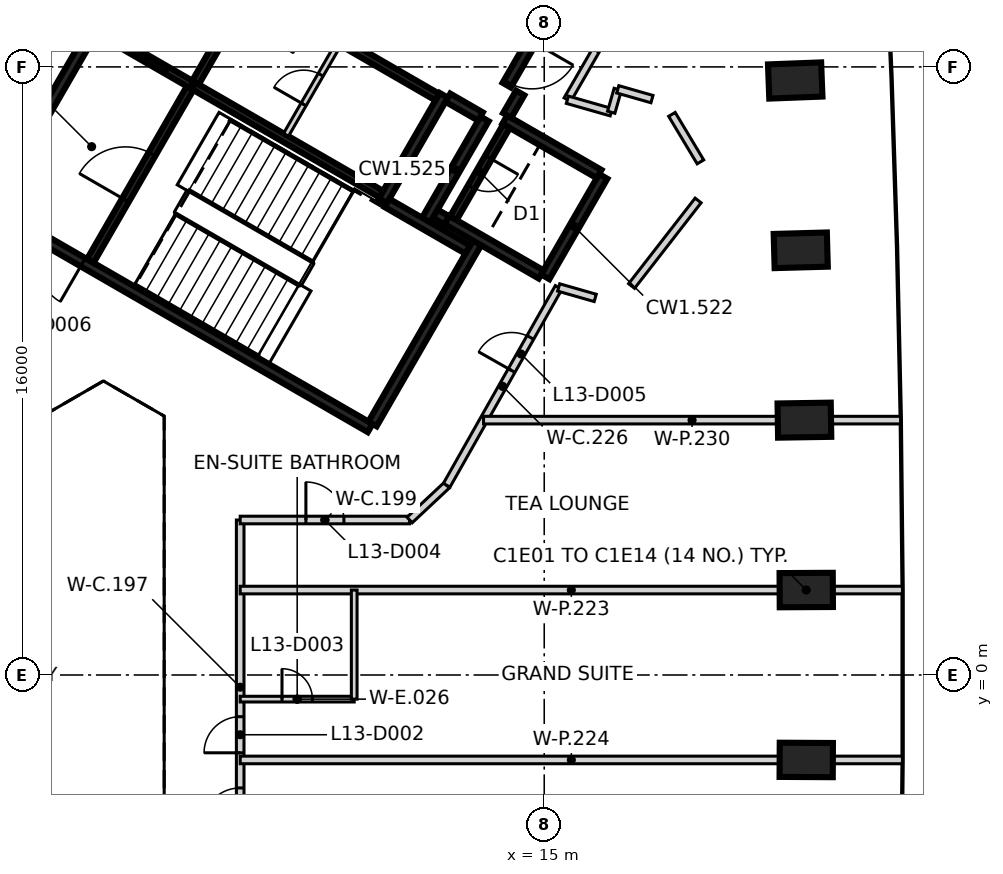
"""IFC4 building model, lengths in metres.
Left out: names, types, materials, properties, quantities, classifications, styles, units other than length and angle.
Written with IfcOpenShell. Run it as: python <this file> out.ifc"""

import sys

from ifc_helpers import new_model, si_unit, direction, frame, frame_2d, origin, origin_2d, place, context, subcontext, project, spatial, rectangle, extrude, element, fill, save


model = new_model("IFC4")
c1 = context("Model", 3, precision=1e-05, world=origin(), true_north=direction((0.0, 1.0)))
c2 = subcontext(c1, "Body", "Model", "MODEL_VIEW")
j1 = project(units=[si_unit("LENGTHUNIT", "METRE"), si_unit("PLANEANGLEUNIT", "RADIAN")], contexts=[c1])
p1 = place(None, origin())
s1 = spatial("IfcSite", under=j1, at=p1, CompositionType="ELEMENT")
p2 = place(p1, origin())
s2 = spatial("IfcBuilding", under=s1, at=p2, CompositionType="ELEMENT")
p3 = place(p2, frame((0.0, 0.0, 60.2)))
s3 = spatial("IfcBuildingStorey", under=s2, at=p3, CompositionType="ELEMENT", Elevation=60.2)
for number, where, z_axis, x_axis in (
    (1, (21.894, -2.235, -0.475), (0.0, 0.0, 1.0), (-1.0, 0.005, 0.0)),
    (2, (21.894, 2.235, -0.475), (0.0, 0.0, 1.0), (1.0, 0.005, 0.0)),
    (3, (21.846, 6.706, -0.475), (0.0, 0.0, 1.0), (1.0, 0.016, 0.0)),
    (4, (21.749, 11.174, -0.475), (0.0, 0.0, 1.0), (1.0, 0.027, 0.0)),
    (5, (21.604, 15.643, -0.475), (0.0, 0.0, 1.0), (0.999, 0.038, 0.0)),
):
    element("IfcColumn", number, at=place(p3, frame(where, z_axis=z_axis, x_axis=x_axis)), inside=s3, PredefinedType="COLUMN", context=c2, shape_type="SweptSolid", body=[
        extrude(rectangle(XDim=1.4, YDim=0.9, at=origin_2d()), origin(), (0.0, 0.0, 1.0), 3.6),
    ])
p4 = place(p3, frame((10.42, 6.498, 0.0), z_axis=(0.0, 0.0, 1.0), x_axis=(-0.866021906294, 0.500006057782, 0.0)))
e6 = element("IfcWall", 6, at=p4, inside=s3, PredefinedType="SHEAR", context=c2, shape_type="SweptSolid", body=[
    extrude(rectangle(XDim=11.55, YDim=0.25, at=frame_2d((5.775, 0.0))), origin(), (0.0, 0.0, 1.0), 3.125),
])
p5 = place(p4, frame((10.025, 0.0, 0.0)))
e7 = element("IfcOpeningElement", 7, at=p5, cuts=e6, PredefinedType="OPENING", context=c2, shape_type="SweptSolid", body=[
    extrude(rectangle(XDim=1.2, YDim=2.1, at=frame_2d((0.6, 1.05))), frame((0.0, 0.135, 0.0), z_axis=(0.0, -1.0, 0.0), x_axis=(1.0, 0.0, 0.0)), (0.0, 0.0, 1.0), 0.27),
])
p6 = place(p4, frame((8.725, 0.0, 0.0)))
e8 = element("IfcOpeningElement", 8, at=p6, cuts=e6, PredefinedType="OPENING", context=c2, shape_type="SweptSolid", body=[
    extrude(rectangle(XDim=1.2, YDim=2.1, at=frame_2d((0.6, 1.05))), frame((0.0, 0.135, 0.0), z_axis=(0.0, -1.0, 0.0), x_axis=(1.0, 0.0, 0.0)), (0.0, 0.0, 1.0), 0.27),
])
p7 = place(p3, frame((0.48, 12.381, 0.0), z_axis=(0.0, 0.0, 1.0), x_axis=(0.49999885962, 0.866026062182, 0.0)))
e9 = element("IfcWall", 9, at=p7, inside=s3, PredefinedType="SHEAR", context=c2, shape_type="SweptSolid", body=[
    extrude(rectangle(XDim=5.225, YDim=0.25, at=frame_2d((2.612, 0.0))), origin(), (0.0, 0.0, 1.0), 3.125),
])
p8 = place(p3, frame((13.238, 11.378, 0.0), z_axis=(0.0, 0.0, 1.0), x_axis=(-0.500008851346, -0.866020293397, 0.0)))
e10 = element("IfcWall", 10, at=p8, inside=s3, PredefinedType="SHEAR", context=c2, shape_type="SweptSolid", body=[
    extrude(rectangle(XDim=5.51, YDim=0.25, at=frame_2d((2.755, 0.0))), origin(), (0.0, 0.0, 1.0), 3.125),
])
p9 = place(p3, frame((12.357, 15.252, 0.0), z_axis=(0.0, 0.0, 1.0), x_axis=(-0.500028443584, -0.866008981251, 0.0)))
e11 = element("IfcWall", 11, at=p9, inside=s3, PredefinedType="SHEAR", context=c2, shape_type="SweptSolid", body=[
    extrude(rectangle(XDim=3.2, YDim=0.25, at=frame_2d((1.6, 0.0))), origin(), (0.0, 0.0, 1.0), 3.125),
])
p10 = place(p3, frame((16.552, 13.119, 0.0), z_axis=(0.0, 0.0, 1.0), x_axis=(-0.499978833458, -0.866037623948, 0.0)))
e12 = element("IfcWall", 12, at=p10, inside=s3, PredefinedType="SHEAR", context=c2, shape_type="SweptSolid", body=[
    extrude(rectangle(XDim=3.05, YDim=0.25, at=frame_2d((1.525, 0.0))), origin(), (0.0, 0.0, 1.0), 3.125),
])
p11 = place(p3, frame((14.918, 10.54, 0.0), z_axis=(0.0, 0.0, 1.0), x_axis=(-0.866063538972, 0.499933942099, 0.0)))
e13 = element("IfcWall", 13, at=p11, inside=s3, PredefinedType="SHEAR", context=c2, shape_type="SweptSolid", body=[
    extrude(rectangle(XDim=2.865, YDim=0.25, at=frame_2d((1.432, 0.0))), origin(), (0.0, 0.0, 1.0), 3.125),
])
p12 = place(p3, frame((13.963, 14.614, 0.0), z_axis=(0.0, 0.0, 1.0), x_axis=(0.866042235819, -0.499970844928, 0.0)))
e14 = element("IfcWall", 14, at=p12, inside=s3, PredefinedType="SHEAR", context=c2, shape_type="SweptSolid", body=[
    extrude(rectangle(XDim=2.865, YDim=0.25, at=frame_2d((1.432, 0.0))), origin(), (0.0, 0.0, 1.0), 3.125),
])
p13 = place(p3, frame((11.888, 11.961, 0.0), z_axis=(0.0, 0.0, 1.0), x_axis=(0.500003324108, 0.866023484601, 0.0)))
e15 = element("IfcWall", 15, at=p13, inside=s3, PredefinedType="SHEAR", context=c2, shape_type="SweptSolid", body=[
    extrude(rectangle(XDim=3.085, YDim=0.25, at=frame_2d((1.542, 0.0))), origin(), (0.0, 0.0, 1.0), 3.125),
])
p14 = place(p3, frame((10.865, 12.418, 0.0), z_axis=(0.0, 0.0, 1.0), x_axis=(0.866026229868, -0.499998569178, 0.0)))
e16 = element("IfcWall", 16, at=p14, inside=s3, PredefinedType="SHEAR", context=c2, shape_type="SweptSolid", body=[
    extrude(rectangle(XDim=2.449, YDim=0.25, at=frame_2d((1.225, 0.0))), origin(), (0.0, 0.0, 1.0), 3.125),
])
p15 = place(p3, frame((14.945, 17.135, 0.0), z_axis=(0.0, 0.0, 1.0), x_axis=(-0.499983108224, -0.866035156036, 0.0)))
e17 = element("IfcWall", 17, at=p15, inside=s3, PredefinedType="SHEAR", context=c2, shape_type="SweptSolid", body=[
    extrude(rectangle(XDim=1.865, YDim=0.25, at=frame_2d((0.932, 0.0))), origin(), (0.0, 0.0, 1.0), 3.125),
])
p16 = place(p15, frame((0.535, 0.0, 0.0)))
e18 = element("IfcOpeningElement", 18, at=p16, cuts=e17, PredefinedType="OPENING", context=c2, shape_type="SweptSolid", body=[
    extrude(rectangle(XDim=1.25, YDim=2.1, at=frame_2d((0.625, 1.05))), frame((0.0, 0.135, 0.0), z_axis=(0.0, -1.0, 0.0), x_axis=(1.0, 0.0, 0.0)), (0.0, 0.0, 1.0), 0.27),
])
p17 = place(p3, frame((13.322, 14.695, 0.0), z_axis=(0.0, 0.0, 1.0), x_axis=(-0.866017078145, 0.500014420154, 0.0)))
e19 = element("IfcWall", 19, at=p17, inside=s3, PredefinedType="SHEAR", context=c2, shape_type="SweptSolid", body=[
    extrude(rectangle(XDim=0.989, YDim=0.25, at=frame_2d((0.495, 0.0))), origin(), (0.0, 0.0, 1.0), 3.125),
])
p18 = place(p3, frame((14.368, 15.315, 0.0), z_axis=(0.0, 0.0, 1.0), x_axis=(-0.499897359611, -0.866084655132, 0.0)))
e20 = element("IfcWall", 20, at=p18, inside=s3, PredefinedType="SHEAR", context=c2, shape_type="SweptSolid", body=[
    extrude(rectangle(XDim=0.685, YDim=0.25, at=frame_2d((0.342, 0.0))), origin(), (0.0, 0.0, 1.0), 3.125),
])
p19 = place(p3, frame((12.433, 11.964, 0.0), z_axis=(0.0, 0.0, 1.0), x_axis=(-0.866055875208, 0.499947218231, 0.0)))
e21 = element("IfcWall", 21, at=p19, inside=s3, PredefinedType="SHEAR", context=c2, shape_type="SweptSolid", body=[
    extrude(rectangle(XDim=0.345, YDim=0.25, at=frame_2d((0.172, 0.0))), origin(), (0.0, 0.0, 1.0), 3.125),
])
p20 = place(p3, frame((5.775, 15.502, 0.0), z_axis=(0.0, 0.0, 1.0), x_axis=(0.866020080793, -0.500009219579, 0.0)))
e22 = element("IfcWall", 22, at=p20, inside=s3, PredefinedType="SHEAR", context=c2, shape_type="SweptSolid", body=[
    extrude(rectangle(XDim=5.699, YDim=0.2, at=frame_2d((2.85, 0.0))), origin(), (0.0, 0.0, 1.0), 3.125),
])
p21 = place(p3, frame((12.185, 15.207, 0.0), z_axis=(0.0, 0.0, 1.0), x_axis=(-0.866020080793, 0.500009219579, 0.0)))
e23 = element("IfcWall", 23, at=p21, inside=s3, PredefinedType="SHEAR", context=c2, shape_type="SweptSolid", body=[
    extrude(rectangle(XDim=5.699, YDim=0.2, at=frame_2d((2.85, 0.0))), origin(), (0.0, 0.0, 1.0), 3.125),
])
p22 = place(p21, frame((3.874, 0.0, 0.0)))
e24 = element("IfcOpeningElement", 24, at=p22, cuts=e23, PredefinedType="OPENING", context=c2, shape_type="SweptSolid", body=[
    extrude(rectangle(XDim=0.9, YDim=2.1, at=frame_2d((0.45, 1.05))), frame((0.0, 0.11, 0.0), z_axis=(0.0, -1.0, 0.0), x_axis=(1.0, 0.0, 0.0)), (0.0, 0.0, 1.0), 0.22),
])
p23 = place(p3, frame((3.057, 10.895, 0.0), z_axis=(0.0, 0.0, 1.0), x_axis=(0.499989418164, 0.866031513124, 0.0)))
e25 = element("IfcWall", 25, at=p23, inside=s3, PredefinedType="SHEAR", context=c2, shape_type="SweptSolid", body=[
    extrude(rectangle(XDim=5.251, YDim=0.2, at=frame_2d((2.625, 0.0))), origin(), (0.0, 0.0, 1.0), 3.125),
])
p24 = place(p23, frame((1.849, 0.0, 0.0)))
e26 = element("IfcOpeningElement", 26, at=p24, cuts=e25, PredefinedType="OPENING", context=c2, shape_type="SweptSolid", body=[
    extrude(rectangle(XDim=1.4, YDim=2.1, at=frame_2d((0.7, 1.05))), frame((0.0, 0.11, 0.0), z_axis=(0.0, -1.0, 0.0), x_axis=(1.0, 0.0, 0.0)), (0.0, 0.0, 1.0), 0.22),
])
p25 = place(p3, frame((14.008, 14.442, 0.0), z_axis=(0.0, 0.0, 1.0), x_axis=(-0.499986818241, -0.866033014143, 0.0)))
e27 = element("IfcWall", 27, at=p25, inside=s3, PredefinedType="SHEAR", context=c2, shape_type="SweptSolid", body=[
    extrude(rectangle(XDim=2.798, YDim=0.2, at=frame_2d((1.399, 0.0))), origin(), (0.0, 0.0, 1.0), 3.125),
])
p26 = place(p25, frame((0.949, 0.0, 0.0)))
e28 = element("IfcOpeningElement", 28, at=p26, cuts=e27, PredefinedType="OPENING", context=c2, shape_type="SweptSolid", body=[
    extrude(rectangle(XDim=0.9, YDim=2.1, at=frame_2d((0.45, 1.05))), frame((0.0, 0.11, 0.0), z_axis=(0.0, -1.0, 0.0), x_axis=(1.0, 0.0, 0.0)), (0.0, 0.0, 1.0), 0.22),
])
p27 = place(p3, frame((7.199, 17.97, 0.0), z_axis=(0.0, 0.0, 1.0), x_axis=(-0.499968400327, -0.866043647095, 0.0)))
e29 = element("IfcWall", 29, at=p27, inside=s3, PredefinedType="SHEAR", context=c2, shape_type="SweptSolid", body=[
    extrude(rectangle(XDim=2.75, YDim=0.2, at=frame_2d((1.375, 0.0))), origin(), (0.0, 0.0, 1.0), 3.125),
])
p28 = place(p3, frame((5.725, 15.531, 0.0), z_axis=(0.0, 0.0, 1.0), x_axis=(-0.866037306777, 0.499979382845, 0.0)))
e30 = element("IfcWall", 30, at=p28, inside=s3, PredefinedType="SHEAR", context=c2, shape_type="SweptSolid", body=[
    extrude(rectangle(XDim=2.742, YDim=0.2, at=frame_2d((1.371, 0.0))), origin(), (0.0, 0.0, 1.0), 3.125),
])
p29 = place(p28, frame((0.743, 0.0, 0.0)))
e31 = element("IfcOpeningElement", 31, at=p29, cuts=e30, PredefinedType="OPENING", context=c2, shape_type="SweptSolid", body=[
    extrude(rectangle(XDim=1.3, YDim=2.1, at=frame_2d((0.65, 1.05))), frame((0.0, 0.11, 0.0), z_axis=(0.0, -1.0, 0.0), x_axis=(1.0, 0.0, 0.0)), (0.0, 0.0, 1.0), 0.22),
])
p30 = place(p3, frame((8.207, 14.214, 0.0), z_axis=(0.0, 0.0, 1.0), x_axis=(0.499922376475, 0.866070215109, 0.0)))
e32 = element("IfcWall", 32, at=p30, inside=s3, PredefinedType="PARTITIONING", context=c2, shape_type="SweptSolid", body=[
    extrude(rectangle(XDim=2.749, YDim=0.15, at=frame_2d((1.374, 0.0))), origin(), (0.0, 0.0, 1.0), 3.125),
])
p31 = place(p30, frame((0.924, 0.0, 0.0)))
e33 = element("IfcOpeningElement", 33, at=p31, cuts=e32, PredefinedType="OPENING", context=c2, shape_type="SweptSolid", body=[
    extrude(rectangle(XDim=0.9, YDim=2.1, at=frame_2d((0.45, 1.05))), frame((0.0, 0.085, 0.0), z_axis=(0.0, -1.0, 0.0), x_axis=(1.0, 0.0, 0.0)), (0.0, 0.0, 1.0), 0.17),
])
p32 = place(p3, frame((7.0, -4.721, 0.0), z_axis=(0.0, 0.0, 1.0), x_axis=(0.0, 1.0, 0.0)))
e34 = element("IfcWall", 34, at=p32, inside=s3, PredefinedType="PARTITIONING", context=c2, shape_type="SweptSolid", body=[
    extrude(rectangle(XDim=8.799, YDim=0.2, at=frame_2d((4.399, 0.0))), origin(), (0.0, 0.0, 1.0), 3.125),
])
p33 = place(p32, frame((0.749, 0.0, 0.0)))
e35 = element("IfcOpeningElement", 35, at=p33, cuts=e34, PredefinedType="OPENING", context=c2, shape_type="SweptSolid", body=[
    extrude(rectangle(XDim=1.0, YDim=2.1, at=frame_2d((0.5, 1.05))), frame((0.0, 0.11, 0.0), z_axis=(0.0, -1.0, 0.0), x_axis=(1.0, 0.0, 0.0)), (0.0, 0.0, 1.0), 0.22),
])
p34 = place(p32, frame((2.674, 0.0, 0.0)))
e36 = element("IfcOpeningElement", 36, at=p34, cuts=e34, PredefinedType="OPENING", context=c2, shape_type="SweptSolid", body=[
    extrude(rectangle(XDim=0.95, YDim=2.1, at=frame_2d((0.475, 1.05))), frame((0.0, 0.11, 0.0), z_axis=(0.0, -1.0, 0.0), x_axis=(1.0, 0.0, 0.0)), (0.0, 0.0, 1.0), 0.22),
])
p35 = place(p3, frame((7.0, 4.078, 0.0), z_axis=(0.0, 0.0, 1.0), x_axis=(1.0, 0.0, 0.0)))
e37 = element("IfcWall", 37, at=p35, inside=s3, PredefinedType="PARTITIONING", context=c2, shape_type="SweptSolid", body=[
    extrude(rectangle(XDim=4.458, YDim=0.2, at=frame_2d((2.229, 0.0))), origin(), (0.0, 0.0, 1.0), 3.125),
])
p36 = place(p35, frame((1.729, 0.0, 0.0)))
e38 = element("IfcOpeningElement", 38, at=p36, cuts=e37, PredefinedType="OPENING", context=c2, shape_type="SweptSolid", body=[
    extrude(rectangle(XDim=1.0, YDim=2.1, at=frame_2d((0.5, 1.05))), frame((0.0, 0.11, 0.0), z_axis=(0.0, -1.0, 0.0), x_axis=(1.0, 0.0, 0.0)), (0.0, 0.0, 1.0), 0.22),
])
p37 = place(p3, frame((11.458, 4.078, 0.0), z_axis=(0.0, 0.0, 1.0), x_axis=(0.729936032318, 0.683515463412, 0.0)))
e39 = element("IfcWall", 39, at=p37, inside=s3, PredefinedType="PARTITIONING", context=c2, shape_type="SweptSolid", body=[
    extrude(rectangle(XDim=1.336, YDim=0.2, at=frame_2d((0.668, 0.0))), origin(), (0.0, 0.0, 1.0), 3.125),
])
p38 = place(p3, frame((12.433, 4.992, 0.0), z_axis=(0.0, 0.0, 1.0), x_axis=(0.492583054982, 0.870265438786, 0.0)))
e40 = element("IfcWall", 40, at=p38, inside=s3, PredefinedType="PARTITIONING", context=c2, shape_type="SweptSolid", body=[
    extrude(rectangle(XDim=5.981, YDim=0.2, at=frame_2d((2.991, 0.0))), origin(), (0.0, 0.0, 1.0), 3.125),
])
p39 = place(p38, frame((3.469, 0.0, 0.0)))
e41 = element("IfcOpeningElement", 41, at=p39, cuts=e40, PredefinedType="OPENING", context=c2, shape_type="SweptSolid", body=[
    extrude(rectangle(XDim=1.0, YDim=2.1, at=frame_2d((0.5, 1.05))), frame((0.0, 0.11, 0.0), z_axis=(0.0, -1.0, 0.0), x_axis=(1.0, 0.0, 0.0)), (0.0, 0.0, 1.0), 0.22),
])
p40 = place(p3, frame((15.156, 17.13, 0.0), z_axis=(0.0, 0.0, 1.0), x_axis=(0.865755062894, -0.500467952093, 0.0)))
e42 = element("IfcWall", 42, at=p40, inside=s3, PredefinedType="PARTITIONING", context=c2, shape_type="SweptSolid", body=[
    extrude(rectangle(XDim=1.389, YDim=0.2, at=frame_2d((0.694, 0.0))), origin(), (0.0, 0.0, 1.0), 3.125),
])
p41 = place(p3, frame((15.38, 10.197, 0.0), z_axis=(0.0, 0.0, 1.0), x_axis=(0.961523947641, -0.274721127897, 0.0)))
e43 = element("IfcWall", 43, at=p41, inside=s3, PredefinedType="PARTITIONING", context=c2, shape_type="SweptSolid", body=[
    extrude(rectangle(XDim=1.001, YDim=0.2, at=frame_2d((0.5, 0.0))), origin(), (0.0, 0.0, 1.0), 3.125),
])
p42 = place(p3, frame((15.609, 15.136, 0.0), z_axis=(0.0, 0.0, 1.0), x_axis=(0.499501622561, 0.866312950993, 0.0)))
e44 = element("IfcWall", 44, at=p42, inside=s3, PredefinedType="PARTITIONING", context=c2, shape_type="SweptSolid", body=[
    extrude(rectangle(XDim=1.5, YDim=0.2, at=frame_2d((0.75, 0.0))), origin(), (0.0, 0.0, 1.0), 3.125),
])
p43 = place(p3, frame((15.609, 15.136, 0.0), z_axis=(0.0, 0.0, 1.0), x_axis=(0.961662011825, -0.274237442763, 0.0)))
e45 = element("IfcWall", 45, at=p43, inside=s3, PredefinedType="PARTITIONING", context=c2, shape_type="SweptSolid", body=[
    extrude(rectangle(XDim=1.2, YDim=0.2, at=frame_2d((0.6, 0.0))), origin(), (0.0, 0.0, 1.0), 3.125),
])
p44 = place(p3, frame((16.763, 14.807, 0.0), z_axis=(0.0, 0.0, 1.0), x_axis=(0.274464026122, 0.961597368115, 0.0)))
e46 = element("IfcWall", 46, at=p44, inside=s3, PredefinedType="PARTITIONING", context=c2, shape_type="SweptSolid", body=[
    extrude(rectangle(XDim=0.627, YDim=0.2, at=frame_2d((0.313, 0.0))), origin(), (0.0, 0.0, 1.0), 3.125),
])
p45 = place(p3, frame((16.935, 15.41, 0.0), z_axis=(0.0, 0.0, 1.0), x_axis=(0.961602664273, -0.274445470107, 0.0)))
e47 = element("IfcWall", 47, at=p45, inside=s3, PredefinedType="PARTITIONING", context=c2, shape_type="SweptSolid", body=[
    extrude(rectangle(XDim=0.936, YDim=0.2, at=frame_2d((0.468, 0.0))), origin(), (0.0, 0.0, 1.0), 3.125),
])
p46 = place(p3, frame((17.299, 10.235, 0.0), z_axis=(0.0, 0.0, 1.0), x_axis=(0.61377461522, 0.789481299153, 0.0)))
e48 = element("IfcWall", 48, at=p46, inside=s3, PredefinedType="PARTITIONING", context=c2, shape_type="SweptSolid", body=[
    extrude(rectangle(XDim=2.851, YDim=0.2, at=frame_2d((1.426, 0.0))), origin(), (0.0, 0.0, 1.0), 3.125),
])
p47 = place(p3, frame((18.36, 14.751, 0.0), z_axis=(0.0, 0.0, 1.0), x_axis=(0.514495755428, -0.857492925713, 0.0)))
e49 = element("IfcWall", 49, at=p47, inside=s3, PredefinedType="PARTITIONING", context=c2, shape_type="SweptSolid", body=[
    extrude(rectangle(XDim=1.458, YDim=0.2, at=frame_2d((0.729, 0.0))), origin(), (0.0, 0.0, 1.0), 3.125),
])
p48 = place(p3, frame((7.0, 2.235, 0.0), z_axis=(0.0, 0.0, 1.0), x_axis=(1.0, 0.0, 0.0)))
e50 = element("IfcWall", 50, at=p48, inside=s3, PredefinedType="PARTITIONING", context=c2, shape_type="SweptSolid", body=[
    extrude(rectangle(XDim=17.425, YDim=0.2, at=frame_2d((8.712, 0.0))), origin(), (0.0, 0.0, 1.0), 3.125),
])
p49 = place(p3, frame((7.001, -2.235, 0.0), z_axis=(0.0, 0.0, 1.0), x_axis=(1.0, 0.0, 0.0)))
e51 = element("IfcWall", 51, at=p49, inside=s3, PredefinedType="PARTITIONING", context=c2, shape_type="SweptSolid", body=[
    extrude(rectangle(XDim=17.424, YDim=0.2, at=frame_2d((8.712, 0.0))), origin(), (0.0, 0.0, 1.0), 3.125),
])
p50 = place(p3, frame((13.403, 6.706, 0.0), z_axis=(0.0, 0.0, 1.0), x_axis=(1.0, 0.0, 0.0)))
e52 = element("IfcWall", 52, at=p50, inside=s3, PredefinedType="PARTITIONING", context=c2, shape_type="SweptSolid", body=[
    extrude(rectangle(XDim=10.974, YDim=0.2, at=frame_2d((5.487, 0.0))), origin(), (0.0, 0.0, 1.0), 3.125),
])
p51 = place(p3, frame((7.0, -0.635, 0.0), z_axis=(0.0, 0.0, 1.0), x_axis=(1.0, 0.0, 0.0)))
e53 = element("IfcWall", 53, at=p51, inside=s3, PredefinedType="PARTITIONING", context=c2, shape_type="SweptSolid", body=[
    extrude(rectangle(XDim=3.0, YDim=0.15, at=frame_2d((1.5, 0.0))), origin(), (0.0, 0.0, 1.0), 3.125),
])
p52 = place(p51, frame((1.1, 0.0, 0.0)))
e54 = element("IfcOpeningElement", 54, at=p52, cuts=e53, PredefinedType="OPENING", context=c2, shape_type="SweptSolid", body=[
    extrude(rectangle(XDim=0.8, YDim=2.1, at=frame_2d((0.4, 1.05))), frame((0.0, 0.085, 0.0), z_axis=(0.0, -1.0, 0.0), x_axis=(1.0, 0.0, 0.0)), (0.0, 0.0, 1.0), 0.17),
])
p53 = place(p3, frame((10.0, -0.635, 0.0), z_axis=(0.0, 0.0, 1.0), x_axis=(0.0, 1.0, 0.0)))
e55 = element("IfcWall", 55, at=p53, inside=s3, PredefinedType="PARTITIONING", context=c2, shape_type="SweptSolid", body=[
    extrude(rectangle(XDim=2.87, YDim=0.15, at=frame_2d((1.435, 0.0))), origin(), (0.0, 0.0, 1.0), 3.125),
])
p54 = place(p29, origin())
e56 = element("IfcDoor", 56, at=p54, inside=s3, OperationType="SLIDING_TO_LEFT", PredefinedType="DOOR", context=c2, shape_type="SweptSolid", body=[
    extrude(rectangle(XDim=1.3, YDim=2.1, at=frame_2d((0.65, 1.05))), frame((0.0, 0.025, 0.0), z_axis=(0.0, -1.0, 0.0), x_axis=(1.0, 0.0, 0.0)), (0.0, 0.0, 1.0), 0.05),
])
fill(e31, e56)
p55 = place(p16, origin())
e57 = element("IfcDoor", 57, at=p55, inside=s3, OperationType="SINGLE_SWING_LEFT", PredefinedType="DOOR", context=c2, shape_type="SweptSolid", body=[
    extrude(rectangle(XDim=1.25, YDim=2.1, at=frame_2d((0.625, 1.05))), frame((0.0, 0.025, 0.0), z_axis=(0.0, -1.0, 0.0), x_axis=(1.0, 0.0, 0.0)), (0.0, 0.0, 1.0), 0.05),
])
fill(e18, e57)
p56 = place(p6, origin())
e58 = element("IfcDoor", 58, at=p56, inside=s3, OperationType="SINGLE_SWING_RIGHT", PredefinedType="DOOR", context=c2, shape_type="SweptSolid", body=[
    extrude(rectangle(XDim=1.2, YDim=2.1, at=frame_2d((0.6, 1.05))), frame((0.0, 0.025, 0.0), z_axis=(0.0, -1.0, 0.0), x_axis=(1.0, 0.0, 0.0)), (0.0, 0.0, 1.0), 0.05),
])
fill(e8, e58)
p57 = place(p24, origin())
e59 = element("IfcDoor", 59, at=p57, inside=s3, OperationType="SINGLE_SWING_LEFT", PredefinedType="DOOR", context=c2, shape_type="SweptSolid", body=[
    extrude(rectangle(XDim=1.4, YDim=2.1, at=frame_2d((0.7, 1.05))), frame((0.0, 0.025, 0.0), z_axis=(0.0, -1.0, 0.0), x_axis=(1.0, 0.0, 0.0)), (0.0, 0.0, 1.0), 0.05),
])
fill(e26, e59)
p58 = place(p26, origin())
e60 = element("IfcDoor", 60, at=p58, inside=s3, OperationType="SINGLE_SWING_LEFT", PredefinedType="DOOR", context=c2, shape_type="SweptSolid", body=[
    extrude(rectangle(XDim=0.9, YDim=2.1, at=frame_2d((0.45, 1.05))), frame((0.0, 0.025, 0.0), z_axis=(0.0, -1.0, 0.0), x_axis=(1.0, 0.0, 0.0)), (0.0, 0.0, 1.0), 0.05),
])
fill(e28, e60)
p59 = place(p31, origin())
e61 = element("IfcDoor", 61, at=p59, inside=s3, OperationType="SINGLE_SWING_RIGHT", PredefinedType="DOOR", context=c2, shape_type="SweptSolid", body=[
    extrude(rectangle(XDim=0.9, YDim=2.1, at=frame_2d((0.45, 1.05))), frame((0.0, 0.025, 0.0), z_axis=(0.0, -1.0, 0.0), x_axis=(1.0, 0.0, 0.0)), (0.0, 0.0, 1.0), 0.05),
])
fill(e33, e61)
p60 = place(p33, frame((1.0, 0.0, 0.0), z_axis=(0.0, 0.0, 1.0), x_axis=(-1.0, 0.0, 0.0)))
e62 = element("IfcDoor", 62, at=p60, inside=s3, OperationType="SINGLE_SWING_LEFT", PredefinedType="DOOR", context=c2, shape_type="SweptSolid", body=[
    extrude(rectangle(XDim=1.0, YDim=2.1, at=frame_2d((0.5, 1.05))), frame((0.0, 0.025, 0.0), z_axis=(0.0, -1.0, 0.0), x_axis=(1.0, 0.0, 0.0)), (0.0, 0.0, 1.0), 0.05),
])
fill(e35, e62)
p61 = place(p34, frame((0.95, 0.0, 0.0), z_axis=(0.0, 0.0, 1.0), x_axis=(-1.0, 0.0, 0.0)))
e63 = element("IfcDoor", 63, at=p61, inside=s3, OperationType="SINGLE_SWING_LEFT", PredefinedType="DOOR", context=c2, shape_type="SweptSolid", body=[
    extrude(rectangle(XDim=0.95, YDim=2.1, at=frame_2d((0.475, 1.05))), frame((0.0, 0.025, 0.0), z_axis=(0.0, -1.0, 0.0), x_axis=(1.0, 0.0, 0.0)), (0.0, 0.0, 1.0), 0.05),
])
fill(e36, e63)
p62 = place(p52, origin())
e64 = element("IfcDoor", 64, at=p62, inside=s3, OperationType="SINGLE_SWING_LEFT", PredefinedType="DOOR", context=c2, shape_type="SweptSolid", body=[
    extrude(rectangle(XDim=0.8, YDim=2.1, at=frame_2d((0.4, 1.05))), frame((0.0, 0.025, 0.0), z_axis=(0.0, -1.0, 0.0), x_axis=(1.0, 0.0, 0.0)), (0.0, 0.0, 1.0), 0.05),
])
fill(e54, e64)
p63 = place(p36, origin())
e65 = element("IfcDoor", 65, at=p63, inside=s3, OperationType="SINGLE_SWING_LEFT", PredefinedType="DOOR", context=c2, shape_type="SweptSolid", body=[
    extrude(rectangle(XDim=1.0, YDim=2.1, at=frame_2d((0.5, 1.05))), frame((0.0, 0.025, 0.0), z_axis=(0.0, -1.0, 0.0), x_axis=(1.0, 0.0, 0.0)), (0.0, 0.0, 1.0), 0.05),
])
fill(e38, e65)
p64 = place(p39, origin())
e66 = element("IfcDoor", 66, at=p64, inside=s3, OperationType="SINGLE_SWING_LEFT", PredefinedType="DOOR", context=c2, shape_type="SweptSolid", body=[
    extrude(rectangle(XDim=1.0, YDim=2.1, at=frame_2d((0.5, 1.05))), frame((0.0, 0.025, 0.0), z_axis=(0.0, -1.0, 0.0), x_axis=(1.0, 0.0, 0.0)), (0.0, 0.0, 1.0), 0.05),
])
fill(e41, e66)
save(model, sys.argv[1])
